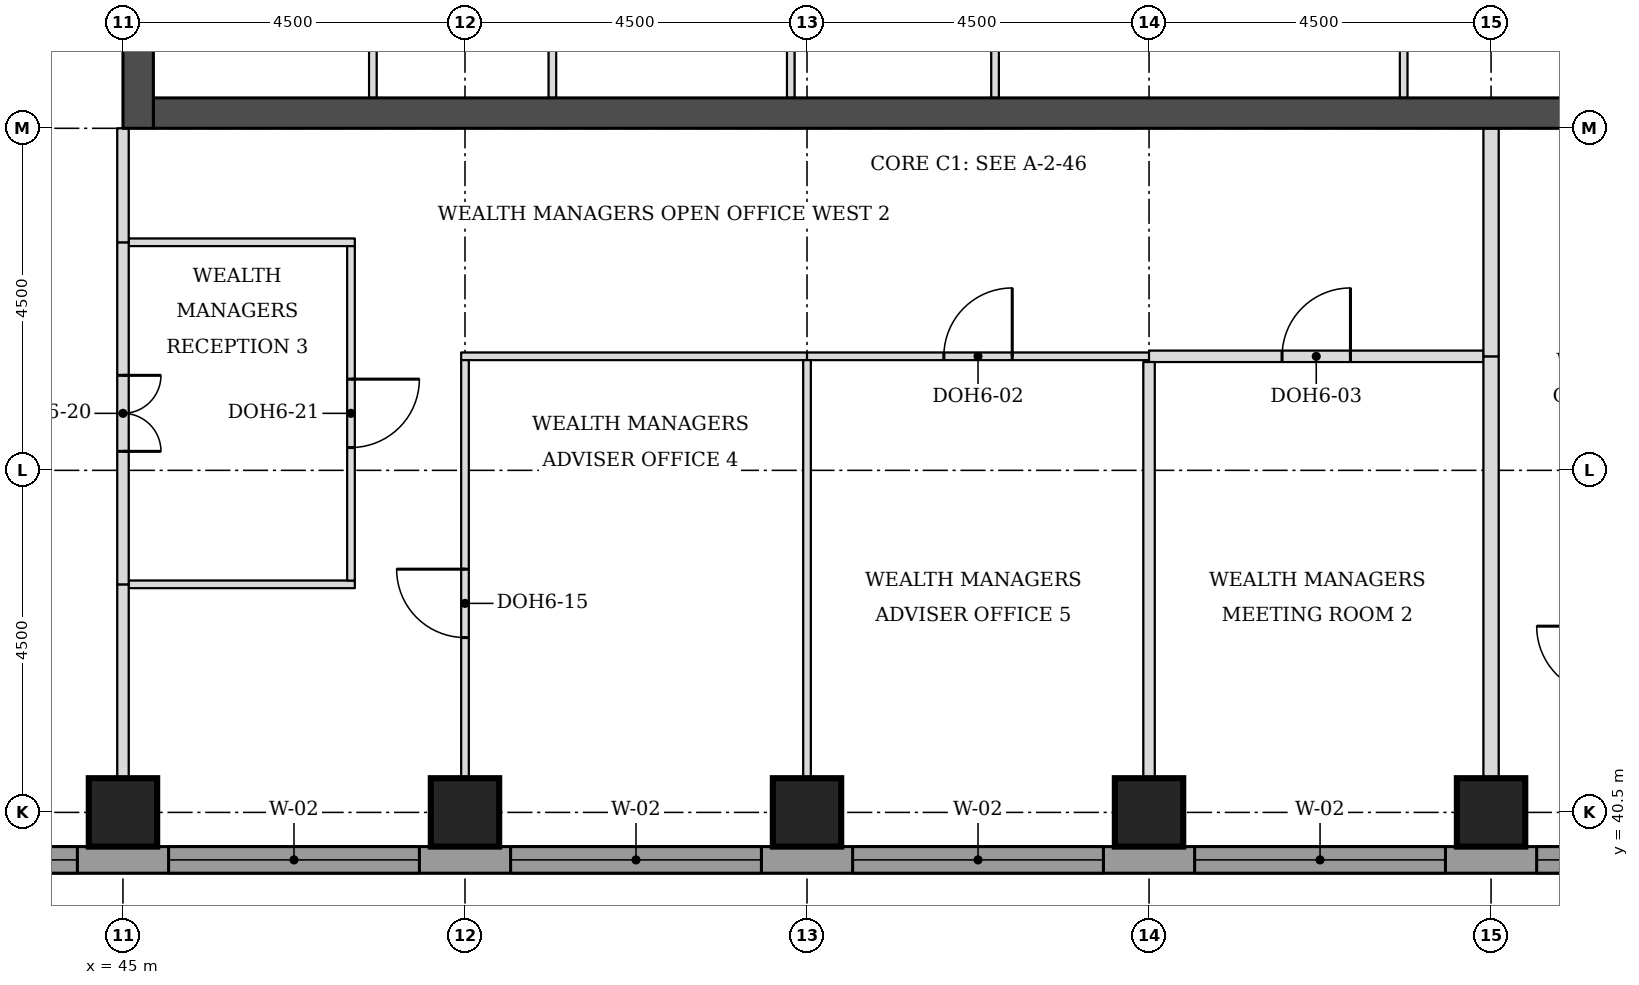
"""IFC4 building model, lengths in metres.
Left out: names, types, materials, properties, quantities, classifications, styles, units other than length and angle.
Written with IfcOpenShell. Run it as: python <this file> out.ifc"""

import sys

from ifc_helpers import new_model, si_unit, direction, frame, frame_2d, origin, origin_2d, place, context, subcontext, project, spatial, rectangle, extrude, element, fill, save


model = new_model("IFC4")
c1 = context("Model", 3, precision=1e-05, world=origin(), true_north=direction((0.0, 1.0)))
c2 = subcontext(c1, "Body", "Model", "MODEL_VIEW")
j1 = project(units=[si_unit("LENGTHUNIT", "METRE"), si_unit("PLANEANGLEUNIT", "RADIAN")], contexts=[c1])
p1 = place(None, origin())
s1 = spatial("IfcSite", under=j1, at=p1, CompositionType="ELEMENT")
p2 = place(p1, origin())
s2 = spatial("IfcBuilding", under=s1, at=p2, CompositionType="ELEMENT")
p3 = place(p2, frame((0.0, 0.0, 184.7)))
s3 = spatial("IfcBuildingStorey", under=s2, at=p3, CompositionType="ELEMENT", Elevation=184.7)
for number, where, z_axis, x_axis in (
    (1, (45.0, 40.5, 0.0), (0.0, 0.0, 1.0), (1.0, 0.0, 0.0)),
    (2, (49.5, 40.5, 0.0), (0.0, 0.0, 1.0), (1.0, 0.0, 0.0)),
    (3, (54.0, 40.5, 0.0), (0.0, 0.0, 1.0), (1.0, 0.0, 0.0)),
    (4, (58.5, 40.5, 0.0), (0.0, 0.0, 1.0), (1.0, 0.0, 0.0)),
    (5, (63.0, 40.5, 0.0), (0.0, 0.0, 1.0), (1.0, 0.0, 0.0)),
):
    element("IfcColumn", number, at=place(p3, frame(where, z_axis=z_axis, x_axis=x_axis)), inside=s3, PredefinedType="COLUMN", context=c2, shape_type="SweptSolid", body=[
        extrude(rectangle(XDim=0.9, YDim=0.9, at=origin_2d()), origin(), (0.0, 0.0, 1.0), 3.7),
    ])
p4 = place(p3, frame((45.4, 49.7, 0.0), z_axis=(0.0, 0.0, 1.0), x_axis=(1.0, 0.0, 0.0)))
e6 = element("IfcWall", 6, at=p4, inside=s3, PredefinedType="SHEAR", context=c2, shape_type="SweptSolid", body=[
    extrude(rectangle(XDim=21.7, YDim=0.4, at=frame_2d((10.85, 0.0))), origin(), (0.0, 0.0, 1.0), 3.7),
])
p5 = place(p3, frame((45.2, 49.5, 0.0), z_axis=(0.0, 0.0, 1.0), x_axis=(0.0, 1.0, 0.0)))
e7 = element("IfcWall", 7, at=p5, inside=s3, PredefinedType="SHEAR", context=c2, shape_type="SweptSolid", body=[
    extrude(rectangle(XDim=22.5, YDim=0.4, at=frame_2d((11.25, 0.0))), origin(), (0.0, 0.0, 1.0), 3.7),
])
p6 = place(p5, frame((4.2, 0.0, 0.0)))
e8 = element("IfcOpeningElement", 8, at=p6, cuts=e7, PredefinedType="OPENING", context=c2, shape_type="SweptSolid", body=[
    extrude(rectangle(XDim=1.8, YDim=2.1, at=frame_2d((0.9, 1.05))), frame((0.0, 0.21, 0.0), z_axis=(0.0, -1.0, 0.0), x_axis=(1.0, 0.0, 0.0)), (0.0, 0.0, 1.0), 0.42),
])
p7 = place(p5, frame((6.9, 0.0, 0.0)))
e9 = element("IfcOpeningElement", 9, at=p7, cuts=e7, PredefinedType="OPENING", context=c2, shape_type="SweptSolid", body=[
    extrude(rectangle(XDim=1.1, YDim=2.1, at=frame_2d((0.55, 1.05))), frame((0.0, 0.21, 0.0), z_axis=(0.0, -1.0, 0.0), x_axis=(1.0, 0.0, 0.0)), (0.0, 0.0, 1.0), 0.42),
])
p8 = place(p5, frame((13.6, 0.0, 0.0)))
e10 = element("IfcOpeningElement", 10, at=p8, cuts=e7, PredefinedType="OPENING", context=c2, shape_type="SweptSolid", body=[
    extrude(rectangle(XDim=1.1, YDim=2.1, at=frame_2d((0.55, 1.05))), frame((0.0, 0.21, 0.0), z_axis=(0.0, -1.0, 0.0), x_axis=(1.0, 0.0, 0.0)), (0.0, 0.0, 1.0), 0.42),
])
p9 = place(p5, frame((16.5, 0.0, 0.0)))
e11 = element("IfcOpeningElement", 11, at=p9, cuts=e7, PredefinedType="OPENING", context=c2, shape_type="SweptSolid", body=[
    extrude(rectangle(XDim=1.8, YDim=2.1, at=frame_2d((0.9, 1.05))), frame((0.0, 0.21, 0.0), z_axis=(0.0, -1.0, 0.0), x_axis=(1.0, 0.0, 0.0)), (0.0, 0.0, 1.0), 0.42),
])
p10 = place(p3, frame((36.0, 39.875, 0.0), z_axis=(0.0, 0.0, 1.0), x_axis=(1.0, 0.0, 0.0)))
e12 = element("IfcWall", 12, at=p10, inside=s3, PredefinedType="STANDARD", context=c2, shape_type="SweptSolid", body=[
    extrude(rectangle(XDim=36.331, YDim=0.35, at=frame_2d((18.166, 0.0))), origin(), (0.0, 0.0, 1.0), 3.525),
])
p11 = place(p10, frame((5.1, 0.0, 0.9)))
e13 = element("IfcOpeningElement", 13, at=p11, cuts=e12, PredefinedType="OPENING", context=c2, shape_type="SweptSolid", body=[
    extrude(rectangle(XDim=3.3, YDim=1.9, at=frame_2d((1.65, 0.95))), frame((0.0, 0.185, 0.0), z_axis=(0.0, -1.0, 0.0), x_axis=(1.0, 0.0, 0.0)), (0.0, 0.0, 1.0), 0.37),
])
p12 = place(p10, frame((9.6, 0.0, 0.9)))
e14 = element("IfcOpeningElement", 14, at=p12, cuts=e12, PredefinedType="OPENING", context=c2, shape_type="SweptSolid", body=[
    extrude(rectangle(XDim=3.3, YDim=1.9, at=frame_2d((1.65, 0.95))), frame((0.0, 0.185, 0.0), z_axis=(0.0, -1.0, 0.0), x_axis=(1.0, 0.0, 0.0)), (0.0, 0.0, 1.0), 0.37),
])
p13 = place(p10, frame((14.1, 0.0, 0.9)))
e15 = element("IfcOpeningElement", 15, at=p13, cuts=e12, PredefinedType="OPENING", context=c2, shape_type="SweptSolid", body=[
    extrude(rectangle(XDim=3.3, YDim=1.9, at=frame_2d((1.65, 0.95))), frame((0.0, 0.185, 0.0), z_axis=(0.0, -1.0, 0.0), x_axis=(1.0, 0.0, 0.0)), (0.0, 0.0, 1.0), 0.37),
])
p14 = place(p10, frame((18.6, 0.0, 0.9)))
e16 = element("IfcOpeningElement", 16, at=p14, cuts=e12, PredefinedType="OPENING", context=c2, shape_type="SweptSolid", body=[
    extrude(rectangle(XDim=3.3, YDim=1.9, at=frame_2d((1.65, 0.95))), frame((0.0, 0.185, 0.0), z_axis=(0.0, -1.0, 0.0), x_axis=(1.0, 0.0, 0.0)), (0.0, 0.0, 1.0), 0.37),
])
p15 = place(p10, frame((23.1, 0.0, 0.9)))
e17 = element("IfcOpeningElement", 17, at=p15, cuts=e12, PredefinedType="OPENING", context=c2, shape_type="SweptSolid", body=[
    extrude(rectangle(XDim=3.3, YDim=1.9, at=frame_2d((1.65, 0.95))), frame((0.0, 0.185, 0.0), z_axis=(0.0, -1.0, 0.0), x_axis=(1.0, 0.0, 0.0)), (0.0, 0.0, 1.0), 0.37),
])
p16 = place(p10, frame((27.6, 0.0, 0.9)))
e18 = element("IfcOpeningElement", 18, at=p16, cuts=e12, PredefinedType="OPENING", context=c2, shape_type="SweptSolid", body=[
    extrude(rectangle(XDim=3.3, YDim=1.9, at=frame_2d((1.65, 0.95))), frame((0.0, 0.185, 0.0), z_axis=(0.0, -1.0, 0.0), x_axis=(1.0, 0.0, 0.0)), (0.0, 0.0, 1.0), 0.37),
])
p17 = place(p3, frame((45.075, 43.5, 0.0), z_axis=(0.0, 0.0, 1.0), x_axis=(1.0, 0.0, 0.0)))
e19 = element("IfcWall", 19, at=p17, inside=s3, PredefinedType="PARTITIONING", context=c2, shape_type="SweptSolid", body=[
    extrude(rectangle(XDim=2.975, YDim=0.1, at=frame_2d((1.488, 0.0))), origin(), (0.0, 0.0, 1.0), 3.55),
])
p18 = place(p3, frame((49.45, 46.5, 0.0), z_axis=(0.0, 0.0, 1.0), x_axis=(1.0, 0.0, 0.0)))
e20 = element("IfcWall", 20, at=p18, inside=s3, PredefinedType="PARTITIONING", context=c2, shape_type="SweptSolid", body=[
    extrude(rectangle(XDim=4.55, YDim=0.1, at=frame_2d((2.275, 0.0))), origin(), (0.0, 0.0, 1.0), 3.55),
])
p19 = place(p3, frame((54.0, 46.5, 0.0), z_axis=(0.0, 0.0, 1.0), x_axis=(1.0, 0.0, 0.0)))
e21 = element("IfcWall", 21, at=p19, inside=s3, PredefinedType="PARTITIONING", context=c2, shape_type="SweptSolid", body=[
    extrude(rectangle(XDim=4.5, YDim=0.1, at=frame_2d((2.25, 0.0))), origin(), (0.0, 0.0, 1.0), 3.55),
])
p20 = place(p19, frame((1.8, 0.0, 0.0)))
e22 = element("IfcOpeningElement", 22, at=p20, cuts=e21, PredefinedType="OPENING", context=c2, shape_type="SweptSolid", body=[
    extrude(rectangle(XDim=0.9, YDim=2.1, at=frame_2d((0.45, 1.05))), frame((0.0, 0.06, 0.0), z_axis=(0.0, -1.0, 0.0), x_axis=(1.0, 0.0, 0.0)), (0.0, 0.0, 1.0), 0.12),
])
p21 = place(p3, frame((58.5, 46.5, 0.0), z_axis=(0.0, 0.0, 1.0), x_axis=(1.0, 0.0, 0.0)))
e23 = element("IfcWall", 23, at=p21, inside=s3, PredefinedType="PARTITIONING", context=c2, shape_type="SweptSolid", body=[
    extrude(rectangle(XDim=4.4, YDim=0.15, at=frame_2d((2.2, 0.0))), origin(), (0.0, 0.0, 1.0), 3.55),
])
p22 = place(p21, frame((1.75, 0.0, 0.0)))
e24 = element("IfcOpeningElement", 24, at=p22, cuts=e23, PredefinedType="OPENING", context=c2, shape_type="SweptSolid", body=[
    extrude(rectangle(XDim=0.9, YDim=2.1, at=frame_2d((0.45, 1.05))), frame((0.0, 0.085, 0.0), z_axis=(0.0, -1.0, 0.0), x_axis=(1.0, 0.0, 0.0)), (0.0, 0.0, 1.0), 0.17),
])
p23 = place(p3, frame((45.075, 48.0, 0.0), z_axis=(0.0, 0.0, 1.0), x_axis=(1.0, 0.0, 0.0)))
e25 = element("IfcWall", 25, at=p23, inside=s3, PredefinedType="PARTITIONING", context=c2, shape_type="SweptSolid", body=[
    extrude(rectangle(XDim=2.975, YDim=0.1, at=frame_2d((1.488, 0.0))), origin(), (0.0, 0.0, 1.0), 3.55),
])
p24 = place(p3, frame((45.0, 40.05, 0.0), z_axis=(0.0, 0.0, 1.0), x_axis=(0.0, 1.0, 0.0)))
e26 = element("IfcWall", 26, at=p24, inside=s3, PredefinedType="PARTITIONING", context=c2, shape_type="SweptSolid", body=[
    extrude(rectangle(XDim=3.45, YDim=0.15, at=frame_2d((1.725, 0.0))), origin(), (0.0, 0.0, 1.0), 3.022),
])
p25 = place(p3, frame((49.5, 40.05, 0.0), z_axis=(0.0, 0.0, 1.0), x_axis=(0.0, 1.0, 0.0)))
e27 = element("IfcWall", 27, at=p25, inside=s3, PredefinedType="PARTITIONING", context=c2, shape_type="SweptSolid", body=[
    extrude(rectangle(XDim=6.4, YDim=0.1, at=frame_2d((3.2, 0.0))), origin(), (0.0, 0.0, 1.0), 3.55),
])
p26 = place(p25, frame((2.75, 0.0, 0.0)))
e28 = element("IfcOpeningElement", 28, at=p26, cuts=e27, PredefinedType="OPENING", context=c2, shape_type="SweptSolid", body=[
    extrude(rectangle(XDim=0.9, YDim=2.1, at=frame_2d((0.45, 1.05))), frame((0.0, 0.06, 0.0), z_axis=(0.0, -1.0, 0.0), x_axis=(1.0, 0.0, 0.0)), (0.0, 0.0, 1.0), 0.12),
])
p27 = place(p3, frame((54.0, 40.05, 0.0), z_axis=(0.0, 0.0, 1.0), x_axis=(0.0, 1.0, 0.0)))
e29 = element("IfcWall", 29, at=p27, inside=s3, PredefinedType="PARTITIONING", context=c2, shape_type="SweptSolid", body=[
    extrude(rectangle(XDim=6.4, YDim=0.1, at=frame_2d((3.2, 0.0))), origin(), (0.0, 0.0, 1.0), 3.55),
])
p28 = place(p3, frame((58.5, 40.05, 0.0), z_axis=(0.0, 0.0, 1.0), x_axis=(0.0, 1.0, 0.0)))
e30 = element("IfcWall", 30, at=p28, inside=s3, PredefinedType="PARTITIONING", context=c2, shape_type="SweptSolid", body=[
    extrude(rectangle(XDim=6.375, YDim=0.15, at=frame_2d((3.188, 0.0))), origin(), (0.0, 0.0, 1.0), 3.55),
])
p29 = place(p3, frame((63.0, 40.05, 0.0), z_axis=(0.0, 0.0, 1.0), x_axis=(0.0, 1.0, 0.0)))
e31 = element("IfcWall", 31, at=p29, inside=s3, PredefinedType="PARTITIONING", context=c2, shape_type="SweptSolid", body=[
    extrude(rectangle(XDim=6.45, YDim=0.2, at=frame_2d((3.225, 0.0))), origin(), (0.0, 0.0, 1.0), 3.55),
])
p30 = place(p3, frame((45.0, 43.5, 0.0), z_axis=(0.0, 0.0, 1.0), x_axis=(0.0, 1.0, 0.0)))
e32 = element("IfcWall", 32, at=p30, inside=s3, PredefinedType="PARTITIONING", context=c2, shape_type="SweptSolid", body=[
    extrude(rectangle(XDim=4.5, YDim=0.15, at=frame_2d((2.25, 0.0))), origin(), (0.0, 0.0, 1.0), 3.022),
])
p31 = place(p30, frame((1.75, 0.0, 0.0)))
e33 = element("IfcOpeningElement", 33, at=p31, cuts=e32, PredefinedType="OPENING", context=c2, shape_type="SweptSolid", body=[
    extrude(rectangle(XDim=1.0, YDim=2.1, at=frame_2d((0.5, 1.05))), frame((0.0, 0.085, 0.0), z_axis=(0.0, -1.0, 0.0), x_axis=(1.0, 0.0, 0.0)), (0.0, 0.0, 1.0), 0.17),
])
p32 = place(p3, frame((48.0, 43.55, 0.0), z_axis=(0.0, 0.0, 1.0), x_axis=(0.0, 1.0, 0.0)))
e34 = element("IfcWall", 34, at=p32, inside=s3, PredefinedType="PARTITIONING", context=c2, shape_type="SweptSolid", body=[
    extrude(rectangle(XDim=4.4, YDim=0.1, at=frame_2d((2.2, 0.0))), origin(), (0.0, 0.0, 1.0), 3.55),
])
p33 = place(p32, frame((1.75, 0.0, 0.0)))
e35 = element("IfcOpeningElement", 35, at=p33, cuts=e34, PredefinedType="OPENING", context=c2, shape_type="SweptSolid", body=[
    extrude(rectangle(XDim=0.9, YDim=2.1, at=frame_2d((0.45, 1.05))), frame((0.0, 0.06, 0.0), z_axis=(0.0, -1.0, 0.0), x_axis=(1.0, 0.0, 0.0)), (0.0, 0.0, 1.0), 0.12),
])
p34 = place(p3, frame((63.0, 46.5, 0.0), z_axis=(0.0, 0.0, 1.0), x_axis=(0.0, 1.0, 0.0)))
e36 = element("IfcWall", 36, at=p34, inside=s3, PredefinedType="PARTITIONING", context=c2, shape_type="SweptSolid", body=[
    extrude(rectangle(XDim=3.0, YDim=0.2, at=frame_2d((1.5, 0.0))), origin(), (0.0, 0.0, 1.0), 3.55),
])
p35 = place(p3, frame((45.0, 48.0, 0.0), z_axis=(0.0, 0.0, 1.0), x_axis=(0.0, 1.0, 0.0)))
e37 = element("IfcWall", 37, at=p35, inside=s3, PredefinedType="PARTITIONING", context=c2, shape_type="SweptSolid", body=[
    extrude(rectangle(XDim=1.5, YDim=0.15, at=frame_2d((0.75, 0.0))), origin(), (0.0, 0.0, 1.0), 3.022),
])
for number, where, z_axis, x_axis in (
    (38, (48.288, 49.9, 0.0), (0.0, 0.0, 1.0), (0.0, 1.0, 0.0)),
    (39, (50.65, 49.9, 0.0), (0.0, 0.0, 1.0), (0.0, 1.0, 0.0)),
    (40, (53.786, 49.9, 0.0), (0.0, 0.0, 1.0), (0.0, 1.0, 0.0)),
    (41, (56.474, 49.9, 0.0), (0.0, 0.0, 1.0), (0.0, 1.0, 0.0)),
    (42, (61.85, 49.9, 0.0), (0.0, 0.0, 1.0), (0.0, 1.0, 0.0)),
):
    element("IfcWall", number, at=place(p3, frame(where, z_axis=z_axis, x_axis=x_axis)), inside=s3, PredefinedType="PARTITIONING", context=c2, shape_type="SweptSolid", body=[
        extrude(rectangle(XDim=3.1, YDim=0.1, at=frame_2d((1.55, 0.0))), origin(), (0.0, 0.0, 1.0), 3.55),
    ])
p36 = place(p11, origin())
e43 = element("IfcWindow", 43, at=p36, inside=s3, PartitioningType="SINGLE_PANEL", PredefinedType="WINDOW", context=c2, shape_type="SweptSolid", body=[
    extrude(rectangle(XDim=3.3, YDim=1.9, at=frame_2d((1.65, 0.95))), frame((0.0, 0.085, 0.0), z_axis=(0.0, -1.0, 0.0), x_axis=(1.0, 0.0, 0.0)), (0.0, 0.0, 1.0), 0.06),
])
fill(e13, e43)
p37 = place(p12, origin())
e44 = element("IfcWindow", 44, at=p37, inside=s3, PartitioningType="SINGLE_PANEL", PredefinedType="WINDOW", context=c2, shape_type="SweptSolid", body=[
    extrude(rectangle(XDim=3.3, YDim=1.9, at=frame_2d((1.65, 0.95))), frame((0.0, 0.085, 0.0), z_axis=(0.0, -1.0, 0.0), x_axis=(1.0, 0.0, 0.0)), (0.0, 0.0, 1.0), 0.06),
])
fill(e14, e44)
p38 = place(p13, origin())
e45 = element("IfcWindow", 45, at=p38, inside=s3, PartitioningType="SINGLE_PANEL", PredefinedType="WINDOW", context=c2, shape_type="SweptSolid", body=[
    extrude(rectangle(XDim=3.3, YDim=1.9, at=frame_2d((1.65, 0.95))), frame((0.0, 0.085, 0.0), z_axis=(0.0, -1.0, 0.0), x_axis=(1.0, 0.0, 0.0)), (0.0, 0.0, 1.0), 0.06),
])
fill(e15, e45)
p39 = place(p14, origin())
e46 = element("IfcWindow", 46, at=p39, inside=s3, PartitioningType="SINGLE_PANEL", PredefinedType="WINDOW", context=c2, shape_type="SweptSolid", body=[
    extrude(rectangle(XDim=3.3, YDim=1.9, at=frame_2d((1.65, 0.95))), frame((0.0, 0.085, 0.0), z_axis=(0.0, -1.0, 0.0), x_axis=(1.0, 0.0, 0.0)), (0.0, 0.0, 1.0), 0.06),
])
fill(e16, e46)
p40 = place(p15, origin())
e47 = element("IfcWindow", 47, at=p40, inside=s3, PartitioningType="SINGLE_PANEL", PredefinedType="WINDOW", context=c2, shape_type="SweptSolid", body=[
    extrude(rectangle(XDim=3.3, YDim=1.9, at=frame_2d((1.65, 0.95))), frame((0.0, 0.085, 0.0), z_axis=(0.0, -1.0, 0.0), x_axis=(1.0, 0.0, 0.0)), (0.0, 0.0, 1.0), 0.06),
])
fill(e17, e47)
p41 = place(p16, origin())
e48 = element("IfcWindow", 48, at=p41, inside=s3, PartitioningType="SINGLE_PANEL", PredefinedType="WINDOW", context=c2, shape_type="SweptSolid", body=[
    extrude(rectangle(XDim=3.3, YDim=1.9, at=frame_2d((1.65, 0.95))), frame((0.0, 0.085, 0.0), z_axis=(0.0, -1.0, 0.0), x_axis=(1.0, 0.0, 0.0)), (0.0, 0.0, 1.0), 0.06),
])
fill(e18, e48)
p42 = place(p31, frame((1.0, 0.0, 0.0), z_axis=(0.0, 0.0, 1.0), x_axis=(-1.0, 0.0, 0.0)))
e49 = element("IfcDoor", 49, at=p42, inside=s3, OperationType="DOUBLE_DOOR_SINGLE_SWING", PredefinedType="DOOR", context=c2, shape_type="SweptSolid", body=[
    extrude(rectangle(XDim=1.0, YDim=2.1, at=frame_2d((0.5, 1.05))), frame((0.0, 0.025, 0.0), z_axis=(0.0, -1.0, 0.0), x_axis=(1.0, 0.0, 0.0)), (0.0, 0.0, 1.0), 0.05),
])
fill(e33, e49)
p43 = place(p33, frame((0.9, 0.0, 0.0), z_axis=(0.0, 0.0, 1.0), x_axis=(-1.0, 0.0, 0.0)))
e50 = element("IfcDoor", 50, at=p43, inside=s3, OperationType="SINGLE_SWING_LEFT", PredefinedType="DOOR", context=c2, shape_type="SweptSolid", body=[
    extrude(rectangle(XDim=0.9, YDim=2.1, at=frame_2d((0.45, 1.05))), frame((0.0, 0.025, 0.0), z_axis=(0.0, -1.0, 0.0), x_axis=(1.0, 0.0, 0.0)), (0.0, 0.0, 1.0), 0.05),
])
fill(e35, e50)
p44 = place(p26, origin())
e51 = element("IfcDoor", 51, at=p44, inside=s3, OperationType="SINGLE_SWING_RIGHT", PredefinedType="DOOR", context=c2, shape_type="SweptSolid", body=[
    extrude(rectangle(XDim=0.9, YDim=2.1, at=frame_2d((0.45, 1.05))), frame((0.0, 0.025, 0.0), z_axis=(0.0, -1.0, 0.0), x_axis=(1.0, 0.0, 0.0)), (0.0, 0.0, 1.0), 0.05),
])
fill(e28, e51)
p45 = place(p20, origin())
e52 = element("IfcDoor", 52, at=p45, inside=s3, OperationType="SINGLE_SWING_RIGHT", PredefinedType="DOOR", context=c2, shape_type="SweptSolid", body=[
    extrude(rectangle(XDim=0.9, YDim=2.1, at=frame_2d((0.45, 1.05))), frame((0.0, 0.025, 0.0), z_axis=(0.0, -1.0, 0.0), x_axis=(1.0, 0.0, 0.0)), (0.0, 0.0, 1.0), 0.05),
])
fill(e22, e52)
p46 = place(p22, origin())
e53 = element("IfcDoor", 53, at=p46, inside=s3, OperationType="SINGLE_SWING_RIGHT", PredefinedType="DOOR", context=c2, shape_type="SweptSolid", body=[
    extrude(rectangle(XDim=0.9, YDim=2.1, at=frame_2d((0.45, 1.05))), frame((0.0, 0.025, 0.0), z_axis=(0.0, -1.0, 0.0), x_axis=(1.0, 0.0, 0.0)), (0.0, 0.0, 1.0), 0.05),
])
fill(e24, e53)
save(model, sys.argv[1])
